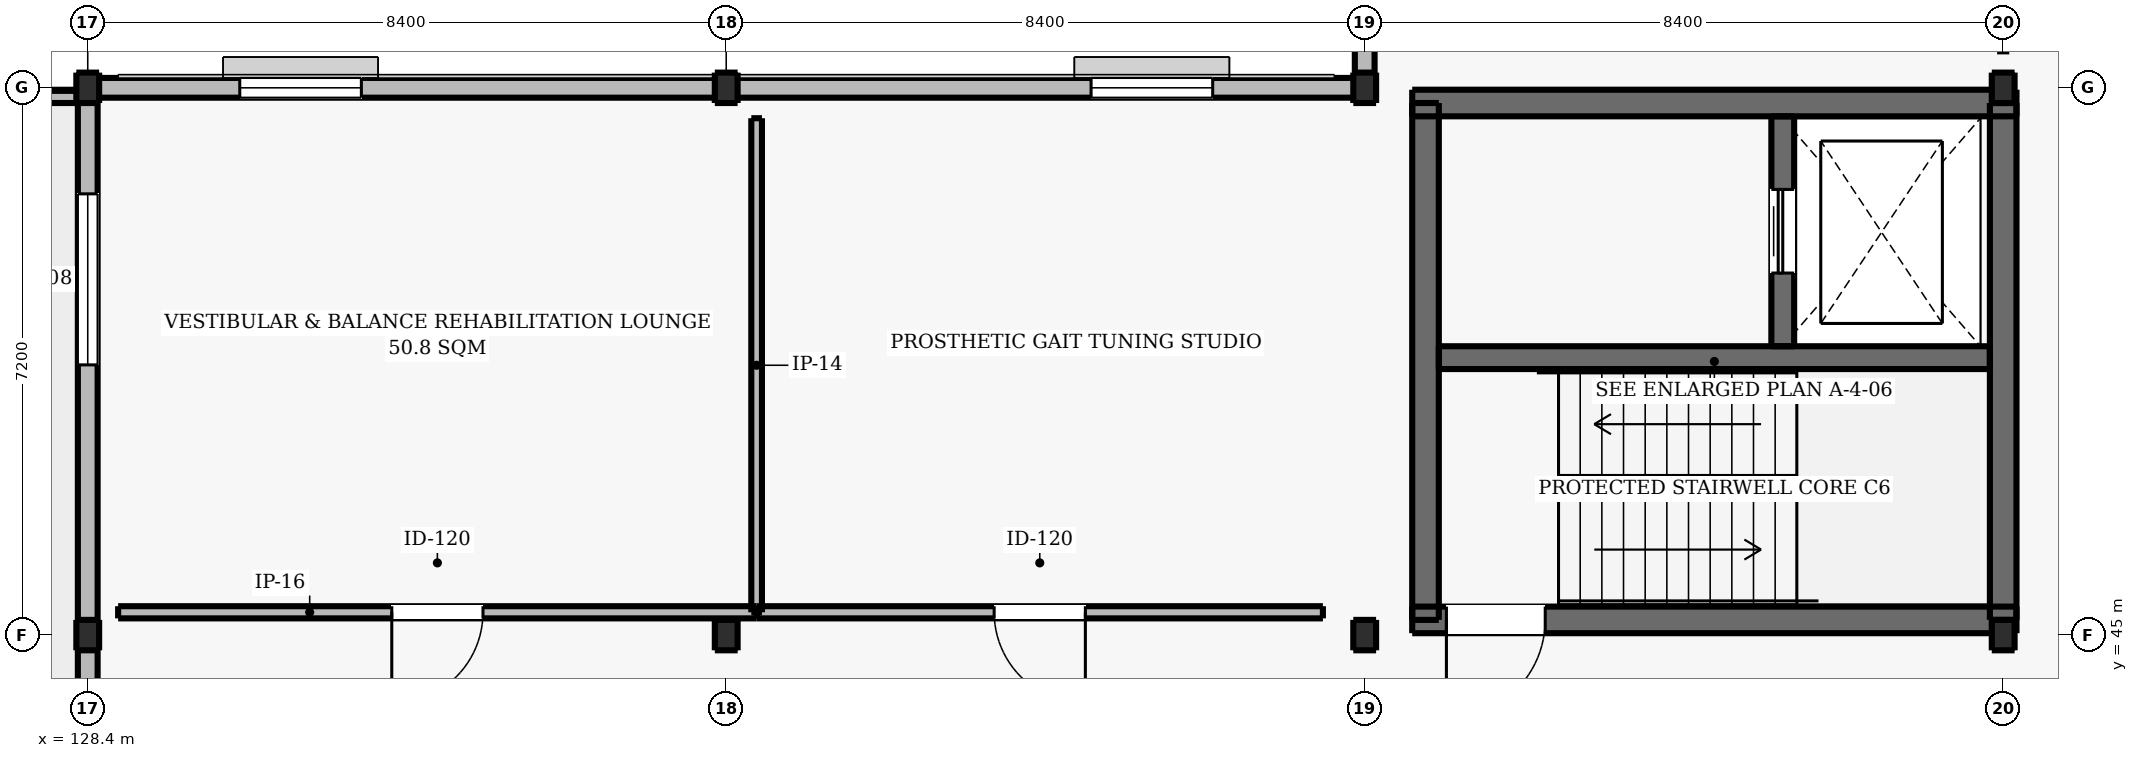
"""IFC4 building model, lengths in metres.
Left out: names, types, materials, properties, quantities, classifications, styles, units other than length and angle.
Written with IfcOpenShell. Run it as: python <this file> out.ifc"""

import sys

from ifc_helpers import new_model, si_unit, direction, frame, frame_2d, origin, origin_2d, place, context, subcontext, project, spatial, rectangle, i_section, extrude, element, fill, save


model = new_model("IFC4")
c1 = context("Model", 3, precision=1e-05, world=origin(), true_north=direction((0.0, 1.0)))
c2 = subcontext(c1, "Body", "Model", "MODEL_VIEW")
j1 = project(units=[si_unit("LENGTHUNIT", "METRE"), si_unit("PLANEANGLEUNIT", "RADIAN")], contexts=[c1])
p1 = place(None, origin())
s1 = spatial("IfcSite", under=j1, at=p1, CompositionType="ELEMENT")
p2 = place(p1, origin())
s2 = spatial("IfcBuilding", under=s1, at=p2, CompositionType="ELEMENT")
p3 = place(p2, frame((0.0, 0.0, 9.6)))
s3 = spatial("IfcBuildingStorey", under=s2, at=p3, CompositionType="ELEMENT", Elevation=9.6)
for number, where, z_axis, x_axis in (
    (1, (128.4, 45.0, 0.0), (0.0, 0.0, 1.0), (1.0, 0.0, 0.0)),
    (2, (128.4, 52.2, 0.0), (0.0, 0.0, 1.0), (1.0, 0.0, 0.0)),
    (3, (136.8, 45.0, 0.0), (0.0, 0.0, 1.0), (1.0, 0.0, 0.0)),
    (4, (136.8, 52.2, 0.0), (0.0, 0.0, 1.0), (1.0, 0.0, 0.0)),
    (5, (145.2, 45.0, 0.0), (0.0, 0.0, 1.0), (1.0, 0.0, 0.0)),
    (6, (145.2, 52.2, 0.0), (0.0, 0.0, 1.0), (1.0, 0.0, 0.0)),
    (7, (153.6, 45.0, 0.0), (0.0, 0.0, 1.0), (1.0, 0.0, 0.0)),
    (8, (153.6, 52.2, 0.0), (0.0, 0.0, 1.0), (1.0, 0.0, 0.0)),
):
    element("IfcColumn", number, at=place(p3, frame(where, z_axis=z_axis, x_axis=x_axis)), inside=s3, PredefinedType="COLUMN", context=c2, shape_type="SweptSolid", body=[
        extrude(i_section(OverallWidth=0.3, OverallDepth=0.4, WebThickness=0.013, FlangeThickness=0.024, FilletRadius=0.027, at=origin_2d()), origin(), (0.0, 0.0, 1.0), 4.2),
    ])
p4 = place(p3, frame((145.825, 45.2, 0.0), z_axis=(0.0, 0.0, 1.0), x_axis=(1.0, 0.0, 0.0)))
e9 = element("IfcWall", 9, at=p4, inside=s3, PredefinedType="SHEAR", context=c2, shape_type="SweptSolid", body=[
    extrude(rectangle(XDim=7.95, YDim=0.35, at=frame_2d((3.975, 0.0))), origin(), (0.0, 0.0, 1.0), 4.2),
])
p5 = place(p4, frame((0.45, 0.0, 0.0)))
e10 = element("IfcOpeningElement", 10, at=p5, cuts=e9, PredefinedType="OPENING", context=c2, shape_type="SweptSolid", body=[
    extrude(rectangle(XDim=1.3, YDim=2.15, at=frame_2d((0.65, 1.075))), frame((0.0, 0.185, 0.0), z_axis=(0.0, -1.0, 0.0), x_axis=(1.0, 0.0, 0.0)), (0.0, 0.0, 1.0), 0.37),
])
p6 = place(p3, frame((145.825, 52.0, 0.0), z_axis=(0.0, 0.0, 1.0), x_axis=(1.0, 0.0, 0.0)))
e11 = element("IfcWall", 11, at=p6, inside=s3, PredefinedType="SHEAR", context=c2, shape_type="SweptSolid", body=[
    extrude(rectangle(XDim=7.95, YDim=0.35, at=frame_2d((3.975, 0.0))), origin(), (0.0, 0.0, 1.0), 4.2),
])
for number, where, z_axis, x_axis in (
    (12, (146.0, 45.2, 0.0), (0.0, 0.0, 1.0), (0.0, 1.0, 0.0)),
    (13, (153.6, 45.2, 0.0), (0.0, 0.0, 1.0), (0.0, 1.0, 0.0)),
):
    element("IfcWall", number, at=place(p3, frame(where, z_axis=z_axis, x_axis=x_axis)), inside=s3, PredefinedType="SHEAR", context=c2, shape_type="SweptSolid", body=[
        extrude(rectangle(XDim=6.8, YDim=0.35, at=frame_2d((3.4, 0.0))), origin(), (0.0, 0.0, 1.0), 4.2),
    ])
p7 = place(p3, frame((146.175, 48.65, 0.0), z_axis=(0.0, 0.0, 1.0), x_axis=(1.0, 0.0, 0.0)))
e14 = element("IfcWall", 14, at=p7, inside=s3, PredefinedType="SHEAR", context=c2, shape_type="SweptSolid", body=[
    extrude(rectangle(XDim=7.25, YDim=0.3, at=frame_2d((3.625, 0.0))), origin(), (0.0, 0.0, 1.0), 4.2),
])
p8 = place(p3, frame((150.7, 48.8, 0.0), z_axis=(0.0, 0.0, 1.0), x_axis=(0.0, 1.0, 0.0)))
e15 = element("IfcWall", 15, at=p8, inside=s3, PredefinedType="SHEAR", context=c2, shape_type="SweptSolid", body=[
    extrude(rectangle(XDim=3.025, YDim=0.3, at=frame_2d((1.512, 0.0))), origin(), (0.0, 0.0, 1.0), 4.2),
])
p9 = place(p8, frame((0.963, 0.0, 0.0)))
e16 = element("IfcOpeningElement", 16, at=p9, cuts=e15, PredefinedType="OPENING", context=c2, shape_type="SweptSolid", body=[
    extrude(rectangle(XDim=1.1, YDim=2.15, at=frame_2d((0.55, 1.075))), frame((0.0, 0.16, 0.0), z_axis=(0.0, -1.0, 0.0), x_axis=(1.0, 0.0, 0.0)), (0.0, 0.0, 1.0), 0.32),
])
p10 = place(p3, frame((145.2, 52.2, 0.0), z_axis=(0.0, 0.0, 1.0), x_axis=(0.0, 1.0, 0.0)))
e17 = element("IfcWall", 17, at=p10, inside=s3, PredefinedType="SOLIDWALL", context=c2, shape_type="SweptSolid", body=[
    extrude(rectangle(XDim=28.8, YDim=0.26, at=frame_2d((14.4, 0.0))), origin(), (0.0, 0.0, 1.0), 3.53),
])
p11 = place(p10, frame((1.6, 0.0, 0.965)))
e18 = element("IfcOpeningElement", 18, at=p11, cuts=e17, PredefinedType="OPENING", context=c2, shape_type="SweptSolid", body=[
    extrude(rectangle(XDim=1.6, YDim=1.6, at=frame_2d((0.8, 0.8))), frame((0.0, 0.14, 0.0), z_axis=(0.0, -1.0, 0.0), x_axis=(1.0, 0.0, 0.0)), (0.0, 0.0, 1.0), 0.28),
])
p12 = place(p10, frame((6.4, 0.0, 0.965)))
e19 = element("IfcOpeningElement", 19, at=p12, cuts=e17, PredefinedType="OPENING", context=c2, shape_type="SweptSolid", body=[
    extrude(rectangle(XDim=1.6, YDim=1.6, at=frame_2d((0.8, 0.8))), frame((0.0, 0.14, 0.0), z_axis=(0.0, -1.0, 0.0), x_axis=(1.0, 0.0, 0.0)), (0.0, 0.0, 1.0), 0.28),
])
p13 = place(p10, frame((16.0, 0.0, 0.965)))
e20 = element("IfcOpeningElement", 20, at=p13, cuts=e17, PredefinedType="OPENING", context=c2, shape_type="SweptSolid", body=[
    extrude(rectangle(XDim=1.6, YDim=1.6, at=frame_2d((0.8, 0.8))), frame((0.0, 0.14, 0.0), z_axis=(0.0, -1.0, 0.0), x_axis=(1.0, 0.0, 0.0)), (0.0, 0.0, 1.0), 0.28),
])
p14 = place(p10, frame((25.6, 0.0, 0.965)))
e21 = element("IfcOpeningElement", 21, at=p14, cuts=e17, PredefinedType="OPENING", context=c2, shape_type="SweptSolid", body=[
    extrude(rectangle(XDim=1.6, YDim=1.6, at=frame_2d((0.8, 0.8))), frame((0.0, 0.14, 0.0), z_axis=(0.0, -1.0, 0.0), x_axis=(1.0, 0.0, 0.0)), (0.0, 0.0, 1.0), 0.28),
])
p15 = place(p3, frame((128.4, 27.0, 0.0), z_axis=(0.0, 0.0, 1.0), x_axis=(0.0, 1.0, 0.0)))
e22 = element("IfcWall", 22, at=p15, inside=s3, PredefinedType="SOLIDWALL", context=c2, shape_type="SweptSolid", body=[
    extrude(rectangle(XDim=25.2, YDim=0.26, at=frame_2d((12.6, 0.0))), origin(), (0.0, 0.0, 1.0), 3.57),
])
p16 = place(p15, frame((15.675, 0.0, 0.0)))
e23 = element("IfcOpeningElement", 23, at=p16, cuts=e22, PredefinedType="OPENING", context=c2, shape_type="SweptSolid", body=[
    extrude(rectangle(XDim=1.65, YDim=2.2, at=frame_2d((0.825, 1.1))), frame((0.0, 0.14, 0.0), z_axis=(0.0, -1.0, 0.0), x_axis=(1.0, 0.0, 0.0)), (0.0, 0.0, 1.0), 0.28),
])
p17 = place(p15, frame((1.395, 0.0, 0.95)))
e24 = element("IfcOpeningElement", 24, at=p17, cuts=e22, PredefinedType="OPENING", context=c2, shape_type="SweptSolid", body=[
    extrude(rectangle(XDim=2.25, YDim=1.7, at=frame_2d((1.125, 0.85))), frame((0.0, 0.14, 0.0), z_axis=(0.0, -1.0, 0.0), x_axis=(1.0, 0.0, 0.0)), (0.0, 0.0, 1.0), 0.28),
])
p18 = place(p15, frame((6.435, 0.0, 0.95)))
e25 = element("IfcOpeningElement", 25, at=p18, cuts=e22, PredefinedType="OPENING", context=c2, shape_type="SweptSolid", body=[
    extrude(rectangle(XDim=2.25, YDim=1.7, at=frame_2d((1.125, 0.85))), frame((0.0, 0.14, 0.0), z_axis=(0.0, -1.0, 0.0), x_axis=(1.0, 0.0, 0.0)), (0.0, 0.0, 1.0), 0.28),
])
p19 = place(p15, frame((11.475, 0.0, 0.95)))
e26 = element("IfcOpeningElement", 26, at=p19, cuts=e22, PredefinedType="OPENING", context=c2, shape_type="SweptSolid", body=[
    extrude(rectangle(XDim=2.25, YDim=1.7, at=frame_2d((1.125, 0.85))), frame((0.0, 0.14, 0.0), z_axis=(0.0, -1.0, 0.0), x_axis=(1.0, 0.0, 0.0)), (0.0, 0.0, 1.0), 0.28),
])
p20 = place(p15, frame((21.555, 0.0, 0.95)))
e27 = element("IfcOpeningElement", 27, at=p20, cuts=e22, PredefinedType="OPENING", context=c2, shape_type="SweptSolid", body=[
    extrude(rectangle(XDim=2.25, YDim=1.7, at=frame_2d((1.125, 0.85))), frame((0.0, 0.14, 0.0), z_axis=(0.0, -1.0, 0.0), x_axis=(1.0, 0.0, 0.0)), (0.0, 0.0, 1.0), 0.28),
])
p21 = place(p3, frame((128.4, 52.2, 0.0), z_axis=(0.0, 0.0, 1.0), x_axis=(1.0, 0.0, 0.0)))
e28 = element("IfcWall", 28, at=p21, inside=s3, PredefinedType="SOLIDWALL", context=c2, shape_type="SweptSolid", body=[
    extrude(rectangle(XDim=16.8, YDim=0.26, at=frame_2d((8.4, 0.0))), origin(), (0.0, 0.0, 1.0), 3.53),
])
p22 = place(p21, frame((2.0, 0.0, 0.965)))
e29 = element("IfcOpeningElement", 29, at=p22, cuts=e28, PredefinedType="OPENING", context=c2, shape_type="SweptSolid", body=[
    extrude(rectangle(XDim=1.6, YDim=1.6, at=frame_2d((0.8, 0.8))), frame((0.0, 0.14, 0.0), z_axis=(0.0, -1.0, 0.0), x_axis=(1.0, 0.0, 0.0)), (0.0, 0.0, 1.0), 0.28),
])
p23 = place(p21, frame((13.2, 0.0, 0.965)))
e30 = element("IfcOpeningElement", 30, at=p23, cuts=e28, PredefinedType="OPENING", context=c2, shape_type="SweptSolid", body=[
    extrude(rectangle(XDim=1.6, YDim=1.6, at=frame_2d((0.8, 0.8))), frame((0.0, 0.14, 0.0), z_axis=(0.0, -1.0, 0.0), x_axis=(1.0, 0.0, 0.0)), (0.0, 0.0, 1.0), 0.28),
])
p24 = place(p3, frame((120.52, 52.08, 0.0), z_axis=(0.0, 0.0, 1.0), x_axis=(1.0, 0.0, 0.0)))
e31 = element("IfcWall", 31, at=p24, inside=s3, PredefinedType="PARAPET", context=c2, shape_type="SweptSolid", body=[
    extrude(rectangle(XDim=7.76, YDim=0.16, at=frame_2d((3.88, 0.0))), origin(), (0.0, 0.0, 1.0), 1.14),
])
p25 = place(p3, frame((128.8, 45.3, 0.0), z_axis=(0.0, 0.0, 1.0), x_axis=(1.0, 0.0, 0.0)))
e32 = element("IfcWall", 32, at=p25, inside=s3, PredefinedType="PARTITIONING", context=c2, shape_type="SweptSolid", body=[
    extrude(rectangle(XDim=8.4, YDim=0.16, at=frame_2d((4.2, 0.0))), origin(), (0.0, 0.0, 1.0), 3.93),
])
p26 = place(p25, frame((3.6, 0.0, 0.0)))
e33 = element("IfcOpeningElement", 33, at=p26, cuts=e32, PredefinedType="OPENING", context=c2, shape_type="SweptSolid", body=[
    extrude(rectangle(XDim=1.2, YDim=2.2, at=frame_2d((0.6, 1.1))), frame((0.0, 0.09, 0.0), z_axis=(0.0, -1.0, 0.0), x_axis=(1.0, 0.0, 0.0)), (0.0, 0.0, 1.0), 0.18),
])
p27 = place(p3, frame((137.2, 45.3, 0.0), z_axis=(0.0, 0.0, 1.0), x_axis=(0.0, 1.0, 0.0)))
e34 = element("IfcWall", 34, at=p27, inside=s3, PredefinedType="PARTITIONING", context=c2, shape_type="SweptSolid", body=[
    extrude(rectangle(XDim=6.5, YDim=0.14, at=frame_2d((3.25, 0.0))), origin(), (0.0, 0.0, 1.0), 3.93),
])
p28 = place(p3, frame((137.2, 45.3, 0.0), z_axis=(0.0, 0.0, 1.0), x_axis=(1.0, 0.0, 0.0)))
e35 = element("IfcWall", 35, at=p28, inside=s3, PredefinedType="PARTITIONING", context=c2, shape_type="SweptSolid", body=[
    extrude(rectangle(XDim=7.45, YDim=0.16, at=frame_2d((3.725, 0.0))), origin(), (0.0, 0.0, 1.0), 3.93),
])
p29 = place(p28, frame((3.125, 0.0, 0.0)))
e36 = element("IfcOpeningElement", 36, at=p29, cuts=e35, PredefinedType="OPENING", context=c2, shape_type="SweptSolid", body=[
    extrude(rectangle(XDim=1.2, YDim=2.2, at=frame_2d((0.6, 1.1))), frame((0.0, 0.09, 0.0), z_axis=(0.0, -1.0, 0.0), x_axis=(1.0, 0.0, 0.0)), (0.0, 0.0, 1.0), 0.18),
])
p30 = place(p20, origin())
e37 = element("IfcWindow", 37, at=p30, inside=s3, PartitioningType="SINGLE_PANEL", PredefinedType="WINDOW", context=c2, shape_type="SweptSolid", body=[
    extrude(rectangle(XDim=2.25, YDim=1.7, at=frame_2d((1.125, 0.85))), frame((0.0, 0.03, 0.0), z_axis=(0.0, -1.0, 0.0), x_axis=(1.0, 0.0, 0.0)), (0.0, 0.0, 1.0), 0.06),
])
fill(e27, e37)
p31 = place(p22, origin())
e38 = element("IfcWindow", 38, at=p31, inside=s3, PartitioningType="SINGLE_PANEL", PredefinedType="WINDOW", context=c2, shape_type="SweptSolid", body=[
    extrude(rectangle(XDim=1.6, YDim=1.6, at=frame_2d((0.8, 0.8))), frame((0.0, 0.03, 0.0), z_axis=(0.0, -1.0, 0.0), x_axis=(1.0, 0.0, 0.0)), (0.0, 0.0, 1.0), 0.06),
])
fill(e29, e38)
p32 = place(p23, origin())
e39 = element("IfcWindow", 39, at=p32, inside=s3, PartitioningType="SINGLE_PANEL", PredefinedType="WINDOW", context=c2, shape_type="SweptSolid", body=[
    extrude(rectangle(XDim=1.6, YDim=1.6, at=frame_2d((0.8, 0.8))), frame((0.0, 0.03, 0.0), z_axis=(0.0, -1.0, 0.0), x_axis=(1.0, 0.0, 0.0)), (0.0, 0.0, 1.0), 0.06),
])
fill(e30, e39)
p33 = place(p9, origin())
e40 = element("IfcDoor", 40, at=p33, inside=s3, OperationType="DOUBLE_DOOR_SLIDING", PredefinedType="DOOR", context=c2, shape_type="SweptSolid", body=[
    extrude(rectangle(XDim=1.1, YDim=2.15, at=frame_2d((0.55, 1.075))), frame((0.0, 0.025, 0.0), z_axis=(0.0, -1.0, 0.0), x_axis=(1.0, 0.0, 0.0)), (0.0, 0.0, 1.0), 0.05),
])
fill(e16, e40)
p34 = place(p5, frame((1.3, 0.0, 0.0), z_axis=(0.0, 0.0, 1.0), x_axis=(-1.0, 0.0, 0.0)))
e41 = element("IfcDoor", 41, at=p34, inside=s3, OperationType="SINGLE_SWING_LEFT", PredefinedType="DOOR", context=c2, shape_type="SweptSolid", body=[
    extrude(rectangle(XDim=1.3, YDim=2.15, at=frame_2d((0.65, 1.075))), frame((0.0, 0.025, 0.0), z_axis=(0.0, -1.0, 0.0), x_axis=(1.0, 0.0, 0.0)), (0.0, 0.0, 1.0), 0.05),
])
fill(e10, e41)
p35 = place(p26, frame((1.2, 0.0, 0.0), z_axis=(0.0, 0.0, 1.0), x_axis=(-1.0, 0.0, 0.0)))
e42 = element("IfcDoor", 42, at=p35, inside=s3, OperationType="SINGLE_SWING_LEFT", PredefinedType="DOOR", context=c2, shape_type="SweptSolid", body=[
    extrude(rectangle(XDim=1.2, YDim=2.2, at=frame_2d((0.6, 1.1))), frame((0.0, 0.025, 0.0), z_axis=(0.0, -1.0, 0.0), x_axis=(1.0, 0.0, 0.0)), (0.0, 0.0, 1.0), 0.05),
])
fill(e33, e42)
p36 = place(p29, frame((1.2, 0.0, 0.0), z_axis=(0.0, 0.0, 1.0), x_axis=(-1.0, 0.0, 0.0)))
e43 = element("IfcDoor", 43, at=p36, inside=s3, OperationType="SINGLE_SWING_RIGHT", PredefinedType="DOOR", context=c2, shape_type="SweptSolid", body=[
    extrude(rectangle(XDim=1.2, YDim=2.2, at=frame_2d((0.6, 1.1))), frame((0.0, 0.025, 0.0), z_axis=(0.0, -1.0, 0.0), x_axis=(1.0, 0.0, 0.0)), (0.0, 0.0, 1.0), 0.05),
])
fill(e36, e43)
save(model, sys.argv[1])
